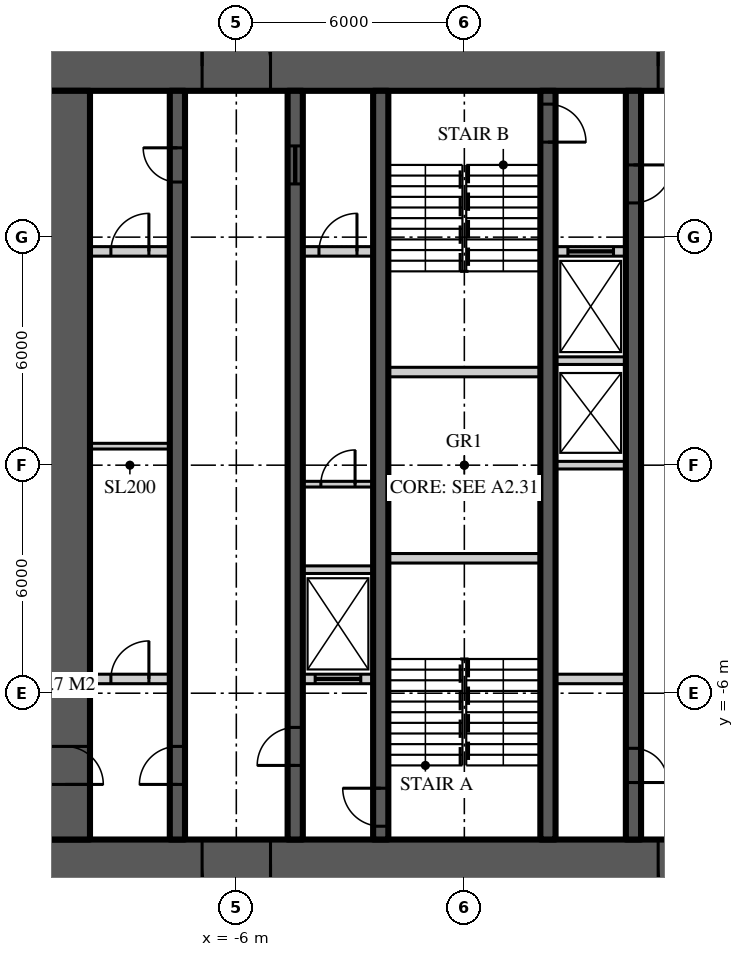
"""IFC4 building model, lengths in metres.
Left out: names, types, materials, properties, quantities, classifications, styles, units other than length and angle.
Written with IfcOpenShell. Run it as: python <this file> out.ifc"""

import sys

from ifc_helpers import new_model, si_unit, direction, frame, frame_2d, origin, place, context, subcontext, project, spatial, rectangle, extrude, element, fill, save


model = new_model("IFC4")
c1 = context("Model", 3, precision=1e-05, world=origin(), true_north=direction((0.0, 1.0)))
c2 = subcontext(c1, "Body", "Model", "MODEL_VIEW")
j1 = project(units=[si_unit("LENGTHUNIT", "METRE"), si_unit("PLANEANGLEUNIT", "RADIAN")], contexts=[c1])
p1 = place(None, origin())
s1 = spatial("IfcSite", under=j1, at=p1, CompositionType="ELEMENT")
p2 = place(p1, origin())
s2 = spatial("IfcBuilding", under=s1, at=p2, CompositionType="ELEMENT")
p3 = place(p2, frame((0.0, 0.0, 236.1)))
s3 = spatial("IfcBuildingStorey", under=s2, at=p3, CompositionType="ELEMENT", Elevation=236.1)
p4 = place(p3, frame((-11.15, 10.5, 0.0), z_axis=(0.0, 0.0, 1.0), x_axis=(1.0, 0.0, 0.0)))
e1 = element("IfcWall", 1, at=p4, inside=s3, PredefinedType="SHEAR", context=c2, shape_type="SweptSolid", body=[
    extrude(rectangle(XDim=22.3, YDim=1.3, at=frame_2d((11.15, 0.0))), origin(), (0.0, 0.0, 1.0), 3.9),
])
p5 = place(p4, frame((4.25, 0.0, 0.0)))
e2 = element("IfcOpeningElement", 2, at=p5, cuts=e1, PredefinedType="OPENING", context=c2, shape_type="SweptSolid", body=[
    extrude(rectangle(XDim=1.8, YDim=2.2, at=frame_2d((0.9, 1.1))), frame((0.0, 0.66, 0.0), z_axis=(0.0, -1.0, 0.0), x_axis=(1.0, 0.0, 0.0)), (0.0, 0.0, 1.0), 1.32),
])
p6 = place(p4, frame((16.25, 0.0, 0.0)))
e3 = element("IfcOpeningElement", 3, at=p6, cuts=e1, PredefinedType="OPENING", context=c2, shape_type="SweptSolid", body=[
    extrude(rectangle(XDim=1.8, YDim=2.2, at=frame_2d((0.9, 1.1))), frame((0.0, 0.66, 0.0), z_axis=(0.0, -1.0, 0.0), x_axis=(1.0, 0.0, 0.0)), (0.0, 0.0, 1.0), 1.32),
])
p7 = place(p3, frame((11.15, -10.5, 0.0), z_axis=(0.0, 0.0, 1.0), x_axis=(-1.0, 0.0, 0.0)))
e4 = element("IfcWall", 4, at=p7, inside=s3, PredefinedType="SHEAR", context=c2, shape_type="SweptSolid", body=[
    extrude(rectangle(XDim=22.3, YDim=1.3, at=frame_2d((11.15, 0.0))), origin(), (0.0, 0.0, 1.0), 3.9),
])
p8 = place(p7, frame((16.25, 0.0, 0.0)))
e5 = element("IfcOpeningElement", 5, at=p8, cuts=e4, PredefinedType="OPENING", context=c2, shape_type="SweptSolid", body=[
    extrude(rectangle(XDim=1.8, YDim=2.2, at=frame_2d((0.9, 1.1))), frame((0.0, 0.66, 0.0), z_axis=(0.0, -1.0, 0.0), x_axis=(1.0, 0.0, 0.0)), (0.0, 0.0, 1.0), 1.32),
])
p9 = place(p7, frame((4.25, 0.0, 0.0)))
e6 = element("IfcOpeningElement", 6, at=p9, cuts=e4, PredefinedType="OPENING", context=c2, shape_type="SweptSolid", body=[
    extrude(rectangle(XDim=1.8, YDim=2.2, at=frame_2d((0.9, 1.1))), frame((0.0, 0.66, 0.0), z_axis=(0.0, -1.0, 0.0), x_axis=(1.0, 0.0, 0.0)), (0.0, 0.0, 1.0), 1.32),
])
p10 = place(p3, frame((-10.5, 9.85, 0.0), z_axis=(0.0, 0.0, 1.0), x_axis=(0.0, -1.0, 0.0)))
e7 = element("IfcWall", 7, at=p10, inside=s3, PredefinedType="SHEAR", context=c2, shape_type="SweptSolid", body=[
    extrude(rectangle(XDim=19.7, YDim=1.3, at=frame_2d((9.85, 0.0))), origin(), (0.0, 0.0, 1.0), 3.9),
])
p11 = place(p10, frame((17.25, 0.0, 0.0)))
e8 = element("IfcOpeningElement", 8, at=p11, cuts=e7, PredefinedType="OPENING", context=c2, shape_type="SweptSolid", body=[
    extrude(rectangle(XDim=1.0, YDim=2.2, at=frame_2d((0.5, 1.1))), frame((0.0, 0.66, 0.0), z_axis=(0.0, -1.0, 0.0), x_axis=(1.0, 0.0, 0.0)), (0.0, 0.0, 1.0), 1.32),
])
p12 = place(p3, frame((-7.55, -9.85, 0.0), z_axis=(0.0, 0.0, 1.0), x_axis=(0.0, 1.0, 0.0)))
e9 = element("IfcWall", 9, at=p12, inside=s3, PredefinedType="SHEAR", context=c2, shape_type="SweptSolid", body=[
    extrude(rectangle(XDim=19.7, YDim=0.4, at=frame_2d((9.85, 0.0))), origin(), (0.0, 0.0, 1.0), 3.9),
])
p13 = place(p12, frame((1.45, 0.0, 0.0)))
e10 = element("IfcOpeningElement", 10, at=p13, cuts=e9, PredefinedType="OPENING", context=c2, shape_type="SweptSolid", body=[
    extrude(rectangle(XDim=1.0, YDim=2.2, at=frame_2d((0.5, 1.1))), frame((0.0, 0.21, 0.0), z_axis=(0.0, -1.0, 0.0), x_axis=(1.0, 0.0, 0.0)), (0.0, 0.0, 1.0), 0.42),
])
p14 = place(p12, frame((17.3, 0.0, 0.0)))
e11 = element("IfcOpeningElement", 11, at=p14, cuts=e9, PredefinedType="OPENING", context=c2, shape_type="SweptSolid", body=[
    extrude(rectangle(XDim=0.9, YDim=2.1, at=frame_2d((0.45, 1.05))), frame((0.0, 0.21, 0.0), z_axis=(0.0, -1.0, 0.0), x_axis=(1.0, 0.0, 0.0)), (0.0, 0.0, 1.0), 0.42),
])
p15 = place(p3, frame((-4.45, -9.85, 0.0), z_axis=(0.0, 0.0, 1.0), x_axis=(0.0, 1.0, 0.0)))
e12 = element("IfcWall", 12, at=p15, inside=s3, PredefinedType="SHEAR", context=c2, shape_type="SweptSolid", body=[
    extrude(rectangle(XDim=19.7, YDim=0.4, at=frame_2d((9.85, 0.0))), origin(), (0.0, 0.0, 1.0), 3.9),
])
p16 = place(p15, frame((1.95, 0.0, 0.0)))
e13 = element("IfcOpeningElement", 13, at=p16, cuts=e12, PredefinedType="OPENING", context=c2, shape_type="SweptSolid", body=[
    extrude(rectangle(XDim=1.0, YDim=2.2, at=frame_2d((0.5, 1.1))), frame((0.0, 0.21, 0.0), z_axis=(0.0, -1.0, 0.0), x_axis=(1.0, 0.0, 0.0)), (0.0, 0.0, 1.0), 0.42),
])
p17 = place(p15, frame((17.25, 0.0, 0.0)))
e14 = element("IfcOpeningElement", 14, at=p17, cuts=e12, PredefinedType="OPENING", context=c2, shape_type="SweptSolid", body=[
    extrude(rectangle(XDim=1.0, YDim=2.1, at=frame_2d((0.5, 1.05))), frame((0.0, 0.21, 0.0), z_axis=(0.0, -1.0, 0.0), x_axis=(1.0, 0.0, 0.0)), (0.0, 0.0, 1.0), 0.42),
])
p18 = place(p3, frame((4.45, 9.85, 0.0), z_axis=(0.0, 0.0, 1.0), x_axis=(0.0, -1.0, 0.0)))
e15 = element("IfcWall", 15, at=p18, inside=s3, PredefinedType="SHEAR", context=c2, shape_type="SweptSolid", body=[
    extrude(rectangle(XDim=19.7, YDim=0.4, at=frame_2d((9.85, 0.0))), origin(), (0.0, 0.0, 1.0), 3.9),
])
p19 = place(p18, frame((1.95, 0.0, 0.0)))
e16 = element("IfcOpeningElement", 16, at=p19, cuts=e15, PredefinedType="OPENING", context=c2, shape_type="SweptSolid", body=[
    extrude(rectangle(XDim=1.0, YDim=2.2, at=frame_2d((0.5, 1.1))), frame((0.0, 0.21, 0.0), z_axis=(0.0, -1.0, 0.0), x_axis=(1.0, 0.0, 0.0)), (0.0, 0.0, 1.0), 0.42),
])
p20 = place(p18, frame((17.3, 0.0, 0.0)))
e17 = element("IfcOpeningElement", 17, at=p20, cuts=e15, PredefinedType="OPENING", context=c2, shape_type="SweptSolid", body=[
    extrude(rectangle(XDim=0.9, YDim=2.1, at=frame_2d((0.45, 1.05))), frame((0.0, 0.21, 0.0), z_axis=(0.0, -1.0, 0.0), x_axis=(1.0, 0.0, 0.0)), (0.0, 0.0, 1.0), 0.42),
])
p21 = place(p3, frame((-2.2, -9.85, 0.0), z_axis=(0.0, 0.0, 1.0), x_axis=(0.0, 1.0, 0.0)))
e18 = element("IfcWall", 18, at=p21, inside=s3, PredefinedType="SHEAR", context=c2, shape_type="SweptSolid", body=[
    extrude(rectangle(XDim=19.7, YDim=0.4, at=frame_2d((9.85, 0.0))), origin(), (0.0, 0.0, 1.0), 3.9),
])
p22 = place(p21, frame((0.35, 0.0, 0.0)))
e19 = element("IfcOpeningElement", 19, at=p22, cuts=e18, PredefinedType="OPENING", context=c2, shape_type="SweptSolid", body=[
    extrude(rectangle(XDim=1.0, YDim=2.2, at=frame_2d((0.5, 1.1))), frame((0.0, 0.21, 0.0), z_axis=(0.0, -1.0, 0.0), x_axis=(1.0, 0.0, 0.0)), (0.0, 0.0, 1.0), 0.42),
])
p23 = place(p3, frame((2.2, 9.85, 0.0), z_axis=(0.0, 0.0, 1.0), x_axis=(0.0, -1.0, 0.0)))
e20 = element("IfcWall", 20, at=p23, inside=s3, PredefinedType="SHEAR", context=c2, shape_type="SweptSolid", body=[
    extrude(rectangle(XDim=19.7, YDim=0.4, at=frame_2d((9.85, 0.0))), origin(), (0.0, 0.0, 1.0), 3.9),
])
p24 = place(p23, frame((0.35, 0.0, 0.0)))
e21 = element("IfcOpeningElement", 21, at=p24, cuts=e20, PredefinedType="OPENING", context=c2, shape_type="SweptSolid", body=[
    extrude(rectangle(XDim=1.0, YDim=2.2, at=frame_2d((0.5, 1.1))), frame((0.0, 0.21, 0.0), z_axis=(0.0, -1.0, 0.0), x_axis=(1.0, 0.0, 0.0)), (0.0, 0.0, 1.0), 0.42),
])
p25 = place(p3, frame((-9.85, 5.625, 0.0), z_axis=(0.0, 0.0, 1.0), x_axis=(1.0, 0.0, 0.0)))
e22 = element("IfcWall", 22, at=p25, inside=s3, PredefinedType="SOLIDWALL", context=c2, shape_type="SweptSolid", body=[
    extrude(rectangle(XDim=2.1, YDim=0.25, at=frame_2d((1.05, 0.0))), origin(), (0.0, 0.0, 1.0), 3.7),
])
p26 = place(p25, frame((0.55, 0.0, 0.0)))
e23 = element("IfcOpeningElement", 23, at=p26, cuts=e22, PredefinedType="OPENING", context=c2, shape_type="SweptSolid", body=[
    extrude(rectangle(XDim=1.0, YDim=2.2, at=frame_2d((0.5, 1.1))), frame((0.0, 0.135, 0.0), z_axis=(0.0, -1.0, 0.0), x_axis=(1.0, 0.0, 0.0)), (0.0, 0.0, 1.0), 0.27),
])
p27 = place(p3, frame((-4.25, 5.625, 0.0), z_axis=(0.0, 0.0, 1.0), x_axis=(1.0, 0.0, 0.0)))
e24 = element("IfcWall", 24, at=p27, inside=s3, PredefinedType="SOLIDWALL", context=c2, shape_type="SweptSolid", body=[
    extrude(rectangle(XDim=1.85, YDim=0.25, at=frame_2d((0.925, 0.0))), origin(), (0.0, 0.0, 1.0), 3.7),
])
p28 = place(p27, frame((0.425, 0.0, 0.0)))
e25 = element("IfcOpeningElement", 25, at=p28, cuts=e24, PredefinedType="OPENING", context=c2, shape_type="SweptSolid", body=[
    extrude(rectangle(XDim=1.0, YDim=2.2, at=frame_2d((0.5, 1.1))), frame((0.0, 0.135, 0.0), z_axis=(0.0, -1.0, 0.0), x_axis=(1.0, 0.0, 0.0)), (0.0, 0.0, 1.0), 0.27),
])
p29 = place(p3, frame((2.4, 5.625, 0.0), z_axis=(0.0, 0.0, 1.0), x_axis=(1.0, 0.0, 0.0)))
e26 = element("IfcWall", 26, at=p29, inside=s3, PredefinedType="SOLIDWALL", context=c2, shape_type="SweptSolid", body=[
    extrude(rectangle(XDim=1.85, YDim=0.25, at=frame_2d((0.925, 0.0))), origin(), (0.0, 0.0, 1.0), 3.7),
])
p30 = place(p29, frame((0.325, 0.0, 0.0)))
e27 = element("IfcOpeningElement", 27, at=p30, cuts=e26, PredefinedType="OPENING", context=c2, shape_type="SweptSolid", body=[
    extrude(rectangle(XDim=1.2, YDim=2.2, at=frame_2d((0.6, 1.1))), frame((0.0, 0.135, 0.0), z_axis=(0.0, -1.0, 0.0), x_axis=(1.0, 0.0, 0.0)), (0.0, 0.0, 1.0), 0.27),
])
p31 = place(p3, frame((-9.85, -5.625, 0.0), z_axis=(0.0, 0.0, 1.0), x_axis=(1.0, 0.0, 0.0)))
e28 = element("IfcWall", 28, at=p31, inside=s3, PredefinedType="SOLIDWALL", context=c2, shape_type="SweptSolid", body=[
    extrude(rectangle(XDim=2.1, YDim=0.25, at=frame_2d((1.05, 0.0))), origin(), (0.0, 0.0, 1.0), 3.7),
])
p32 = place(p31, frame((0.55, 0.0, 0.0)))
e29 = element("IfcOpeningElement", 29, at=p32, cuts=e28, PredefinedType="OPENING", context=c2, shape_type="SweptSolid", body=[
    extrude(rectangle(XDim=1.0, YDim=2.2, at=frame_2d((0.5, 1.1))), frame((0.0, 0.135, 0.0), z_axis=(0.0, -1.0, 0.0), x_axis=(1.0, 0.0, 0.0)), (0.0, 0.0, 1.0), 0.27),
])
p33 = place(p3, frame((-4.25, -5.625, 0.0), z_axis=(0.0, 0.0, 1.0), x_axis=(1.0, 0.0, 0.0)))
e30 = element("IfcWall", 30, at=p33, inside=s3, PredefinedType="SOLIDWALL", context=c2, shape_type="SweptSolid", body=[
    extrude(rectangle(XDim=1.85, YDim=0.25, at=frame_2d((0.925, 0.0))), origin(), (0.0, 0.0, 1.0), 3.7),
])
p34 = place(p33, frame((0.325, 0.0, 0.0)))
e31 = element("IfcOpeningElement", 31, at=p34, cuts=e30, PredefinedType="OPENING", context=c2, shape_type="SweptSolid", body=[
    extrude(rectangle(XDim=1.2, YDim=2.2, at=frame_2d((0.6, 1.1))), frame((0.0, 0.135, 0.0), z_axis=(0.0, -1.0, 0.0), x_axis=(1.0, 0.0, 0.0)), (0.0, 0.0, 1.0), 0.27),
])
p35 = place(p3, frame((2.4, -5.625, 0.0), z_axis=(0.0, 0.0, 1.0), x_axis=(1.0, 0.0, 0.0)))
e32 = element("IfcWall", 32, at=p35, inside=s3, PredefinedType="SOLIDWALL", context=c2, shape_type="SweptSolid", body=[
    extrude(rectangle(XDim=1.85, YDim=0.25, at=frame_2d((0.925, 0.0))), origin(), (0.0, 0.0, 1.0), 3.7),
])
for number, where, z_axis, x_axis in (
    (33, (-2.0, -2.45, 0.0), (0.0, 0.0, 1.0), (1.0, 0.0, 0.0)),
    (34, (-2.0, 2.45, 0.0), (0.0, 0.0, 1.0), (1.0, 0.0, 0.0)),
):
    element("IfcWall", number, at=place(p3, frame(where, z_axis=z_axis, x_axis=x_axis)), inside=s3, PredefinedType="SOLIDWALL", context=c2, shape_type="SweptSolid", body=[
        extrude(rectangle(XDim=4.0, YDim=0.25, at=frame_2d((2.0, 0.0))), origin(), (0.0, 0.0, 1.0), 3.7),
    ])
for number, where, z_axis, x_axis in (
    (35, (-4.25, -2.75, 0.0), (0.0, 0.0, 1.0), (1.0, 0.0, 0.0)),
    (36, (2.4, 0.0, 0.0), (0.0, 0.0, 1.0), (1.0, 0.0, 0.0)),
    (37, (2.4, 2.75, 0.0), (0.0, 0.0, 1.0), (1.0, 0.0, 0.0)),
):
    element("IfcWall", number, at=place(p3, frame(where, z_axis=z_axis, x_axis=x_axis)), inside=s3, PredefinedType="SOLIDWALL", context=c2, shape_type="SweptSolid", body=[
        extrude(rectangle(XDim=1.85, YDim=0.2, at=frame_2d((0.925, 0.0))), origin(), (0.0, 0.0, 1.0), 3.7),
    ])
p36 = place(p3, frame((-9.85, 0.5, 0.0), z_axis=(0.0, 0.0, 1.0), x_axis=(1.0, 0.0, 0.0)))
e38 = element("IfcWall", 38, at=p36, inside=s3, PredefinedType="SOLIDWALL", context=c2, shape_type="SweptSolid", body=[
    extrude(rectangle(XDim=2.1, YDim=0.15, at=frame_2d((1.05, 0.0))), origin(), (0.0, 0.0, 1.0), 3.77),
])
p37 = place(p3, frame((-4.25, -0.5, 0.0), z_axis=(0.0, 0.0, 1.0), x_axis=(1.0, 0.0, 0.0)))
e39 = element("IfcWall", 39, at=p37, inside=s3, PredefinedType="SOLIDWALL", context=c2, shape_type="SweptSolid", body=[
    extrude(rectangle(XDim=1.85, YDim=0.15, at=frame_2d((0.925, 0.0))), origin(), (0.0, 0.0, 1.0), 3.77),
])
p38 = place(p37, frame((0.475, 0.0, 0.0)))
e40 = element("IfcOpeningElement", 40, at=p38, cuts=e39, PredefinedType="OPENING", context=c2, shape_type="SweptSolid", body=[
    extrude(rectangle(XDim=0.9, YDim=2.1, at=frame_2d((0.45, 1.05))), frame((0.0, 0.085, 0.0), z_axis=(0.0, -1.0, 0.0), x_axis=(1.0, 0.0, 0.0)), (0.0, 0.0, 1.0), 0.17),
])
p39 = place(p5, origin())
e41 = element("IfcDoor", 41, at=p39, inside=s3, OperationType="DOUBLE_DOOR_DOUBLE_SWING", PredefinedType="DOOR", context=c2, shape_type="SweptSolid", body=[
    extrude(rectangle(XDim=1.8, YDim=2.2, at=frame_2d((0.9, 1.1))), frame((0.0, 0.025, 0.0), z_axis=(0.0, -1.0, 0.0), x_axis=(1.0, 0.0, 0.0)), (0.0, 0.0, 1.0), 0.05),
])
fill(e2, e41)
p40 = place(p8, origin())
e42 = element("IfcDoor", 42, at=p40, inside=s3, OperationType="DOUBLE_DOOR_DOUBLE_SWING", PredefinedType="DOOR", context=c2, shape_type="SweptSolid", body=[
    extrude(rectangle(XDim=1.8, YDim=2.2, at=frame_2d((0.9, 1.1))), frame((0.0, 0.025, 0.0), z_axis=(0.0, -1.0, 0.0), x_axis=(1.0, 0.0, 0.0)), (0.0, 0.0, 1.0), 0.05),
])
fill(e5, e42)
p41 = place(p6, origin())
e43 = element("IfcDoor", 43, at=p41, inside=s3, OperationType="DOUBLE_DOOR_DOUBLE_SWING", PredefinedType="DOOR", context=c2, shape_type="SweptSolid", body=[
    extrude(rectangle(XDim=1.8, YDim=2.2, at=frame_2d((0.9, 1.1))), frame((0.0, 0.025, 0.0), z_axis=(0.0, -1.0, 0.0), x_axis=(1.0, 0.0, 0.0)), (0.0, 0.0, 1.0), 0.05),
])
fill(e3, e43)
p42 = place(p9, origin())
e44 = element("IfcDoor", 44, at=p42, inside=s3, OperationType="DOUBLE_DOOR_DOUBLE_SWING", PredefinedType="DOOR", context=c2, shape_type="SweptSolid", body=[
    extrude(rectangle(XDim=1.8, YDim=2.2, at=frame_2d((0.9, 1.1))), frame((0.0, 0.025, 0.0), z_axis=(0.0, -1.0, 0.0), x_axis=(1.0, 0.0, 0.0)), (0.0, 0.0, 1.0), 0.05),
])
fill(e6, e44)
p43 = place(p13, origin())
e45 = element("IfcDoor", 45, at=p43, inside=s3, OperationType="SINGLE_SWING_LEFT", PredefinedType="DOOR", context=c2, shape_type="SweptSolid", body=[
    extrude(rectangle(XDim=1.0, YDim=2.2, at=frame_2d((0.5, 1.1))), frame((0.0, 0.025, 0.0), z_axis=(0.0, -1.0, 0.0), x_axis=(1.0, 0.0, 0.0)), (0.0, 0.0, 1.0), 0.05),
])
fill(e10, e45)
p44 = place(p11, origin())
e46 = element("IfcDoor", 46, at=p44, inside=s3, OperationType="SINGLE_SWING_RIGHT", PredefinedType="DOOR", context=c2, shape_type="SweptSolid", body=[
    extrude(rectangle(XDim=1.0, YDim=2.2, at=frame_2d((0.5, 1.1))), frame((0.0, 0.025, 0.0), z_axis=(0.0, -1.0, 0.0), x_axis=(1.0, 0.0, 0.0)), (0.0, 0.0, 1.0), 0.05),
])
fill(e8, e46)
p45 = place(p16, origin())
e47 = element("IfcDoor", 47, at=p45, inside=s3, OperationType="SINGLE_SWING_LEFT", PredefinedType="DOOR", context=c2, shape_type="SweptSolid", body=[
    extrude(rectangle(XDim=1.0, YDim=2.2, at=frame_2d((0.5, 1.1))), frame((0.0, 0.025, 0.0), z_axis=(0.0, -1.0, 0.0), x_axis=(1.0, 0.0, 0.0)), (0.0, 0.0, 1.0), 0.05),
])
fill(e13, e47)
p46 = place(p22, origin())
e48 = element("IfcDoor", 48, at=p46, inside=s3, OperationType="SINGLE_SWING_RIGHT", PredefinedType="DOOR", context=c2, shape_type="SweptSolid", body=[
    extrude(rectangle(XDim=1.0, YDim=2.2, at=frame_2d((0.5, 1.1))), frame((0.0, 0.025, 0.0), z_axis=(0.0, -1.0, 0.0), x_axis=(1.0, 0.0, 0.0)), (0.0, 0.0, 1.0), 0.05),
])
fill(e19, e48)
p47 = place(p19, origin())
e49 = element("IfcDoor", 49, at=p47, inside=s3, OperationType="SINGLE_SWING_LEFT", PredefinedType="DOOR", context=c2, shape_type="SweptSolid", body=[
    extrude(rectangle(XDim=1.0, YDim=2.2, at=frame_2d((0.5, 1.1))), frame((0.0, 0.025, 0.0), z_axis=(0.0, -1.0, 0.0), x_axis=(1.0, 0.0, 0.0)), (0.0, 0.0, 1.0), 0.05),
])
fill(e16, e49)
p48 = place(p24, origin())
e50 = element("IfcDoor", 50, at=p48, inside=s3, OperationType="SINGLE_SWING_RIGHT", PredefinedType="DOOR", context=c2, shape_type="SweptSolid", body=[
    extrude(rectangle(XDim=1.0, YDim=2.2, at=frame_2d((0.5, 1.1))), frame((0.0, 0.025, 0.0), z_axis=(0.0, -1.0, 0.0), x_axis=(1.0, 0.0, 0.0)), (0.0, 0.0, 1.0), 0.05),
])
fill(e21, e50)
p49 = place(p14, origin())
e51 = element("IfcDoor", 51, at=p49, inside=s3, OperationType="SINGLE_SWING_RIGHT", PredefinedType="DOOR", context=c2, shape_type="SweptSolid", body=[
    extrude(rectangle(XDim=0.9, YDim=2.1, at=frame_2d((0.45, 1.05))), frame((0.0, 0.025, 0.0), z_axis=(0.0, -1.0, 0.0), x_axis=(1.0, 0.0, 0.0)), (0.0, 0.0, 1.0), 0.05),
])
fill(e11, e51)
p50 = place(p17, origin())
e52 = element("IfcDoor", 52, at=p50, inside=s3, OperationType="SLIDING_TO_LEFT", PredefinedType="DOOR", context=c2, shape_type="SweptSolid", body=[
    extrude(rectangle(XDim=1.0, YDim=2.1, at=frame_2d((0.5, 1.05))), frame((0.0, 0.025, 0.0), z_axis=(0.0, -1.0, 0.0), x_axis=(1.0, 0.0, 0.0)), (0.0, 0.0, 1.0), 0.05),
])
fill(e14, e52)
p51 = place(p20, origin())
e53 = element("IfcDoor", 53, at=p51, inside=s3, OperationType="SINGLE_SWING_RIGHT", PredefinedType="DOOR", context=c2, shape_type="SweptSolid", body=[
    extrude(rectangle(XDim=0.9, YDim=2.1, at=frame_2d((0.45, 1.05))), frame((0.0, 0.025, 0.0), z_axis=(0.0, -1.0, 0.0), x_axis=(1.0, 0.0, 0.0)), (0.0, 0.0, 1.0), 0.05),
])
fill(e17, e53)
p52 = place(p34, origin())
e54 = element("IfcDoor", 54, at=p52, inside=s3, OperationType="SLIDING_TO_LEFT", PredefinedType="DOOR", context=c2, shape_type="SweptSolid", body=[
    extrude(rectangle(XDim=1.2, YDim=2.2, at=frame_2d((0.6, 1.1))), frame((0.0, 0.025, 0.0), z_axis=(0.0, -1.0, 0.0), x_axis=(1.0, 0.0, 0.0)), (0.0, 0.0, 1.0), 0.05),
])
fill(e31, e54)
p53 = place(p30, origin())
e55 = element("IfcDoor", 55, at=p53, inside=s3, OperationType="SLIDING_TO_LEFT", PredefinedType="DOOR", context=c2, shape_type="SweptSolid", body=[
    extrude(rectangle(XDim=1.2, YDim=2.2, at=frame_2d((0.6, 1.1))), frame((0.0, 0.025, 0.0), z_axis=(0.0, -1.0, 0.0), x_axis=(1.0, 0.0, 0.0)), (0.0, 0.0, 1.0), 0.05),
])
fill(e27, e55)
p54 = place(p26, origin())
e56 = element("IfcDoor", 56, at=p54, inside=s3, OperationType="SINGLE_SWING_RIGHT", PredefinedType="DOOR", context=c2, shape_type="SweptSolid", body=[
    extrude(rectangle(XDim=1.0, YDim=2.2, at=frame_2d((0.5, 1.1))), frame((0.0, 0.025, 0.0), z_axis=(0.0, -1.0, 0.0), x_axis=(1.0, 0.0, 0.0)), (0.0, 0.0, 1.0), 0.05),
])
fill(e23, e56)
p55 = place(p32, origin())
e57 = element("IfcDoor", 57, at=p55, inside=s3, OperationType="SINGLE_SWING_RIGHT", PredefinedType="DOOR", context=c2, shape_type="SweptSolid", body=[
    extrude(rectangle(XDim=1.0, YDim=2.2, at=frame_2d((0.5, 1.1))), frame((0.0, 0.025, 0.0), z_axis=(0.0, -1.0, 0.0), x_axis=(1.0, 0.0, 0.0)), (0.0, 0.0, 1.0), 0.05),
])
fill(e29, e57)
p56 = place(p38, origin())
e58 = element("IfcDoor", 58, at=p56, inside=s3, OperationType="SINGLE_SWING_RIGHT", PredefinedType="DOOR", context=c2, shape_type="SweptSolid", body=[
    extrude(rectangle(XDim=0.9, YDim=2.1, at=frame_2d((0.45, 1.05))), frame((0.0, 0.025, 0.0), z_axis=(0.0, -1.0, 0.0), x_axis=(1.0, 0.0, 0.0)), (0.0, 0.0, 1.0), 0.05),
])
fill(e40, e58)
p57 = place(p28, origin())
e59 = element("IfcDoor", 59, at=p57, inside=s3, OperationType="SINGLE_SWING_RIGHT", PredefinedType="DOOR", context=c2, shape_type="SweptSolid", body=[
    extrude(rectangle(XDim=1.0, YDim=2.2, at=frame_2d((0.5, 1.1))), frame((0.0, 0.025, 0.0), z_axis=(0.0, -1.0, 0.0), x_axis=(1.0, 0.0, 0.0)), (0.0, 0.0, 1.0), 0.05),
])
fill(e25, e59)
save(model, sys.argv[1])
